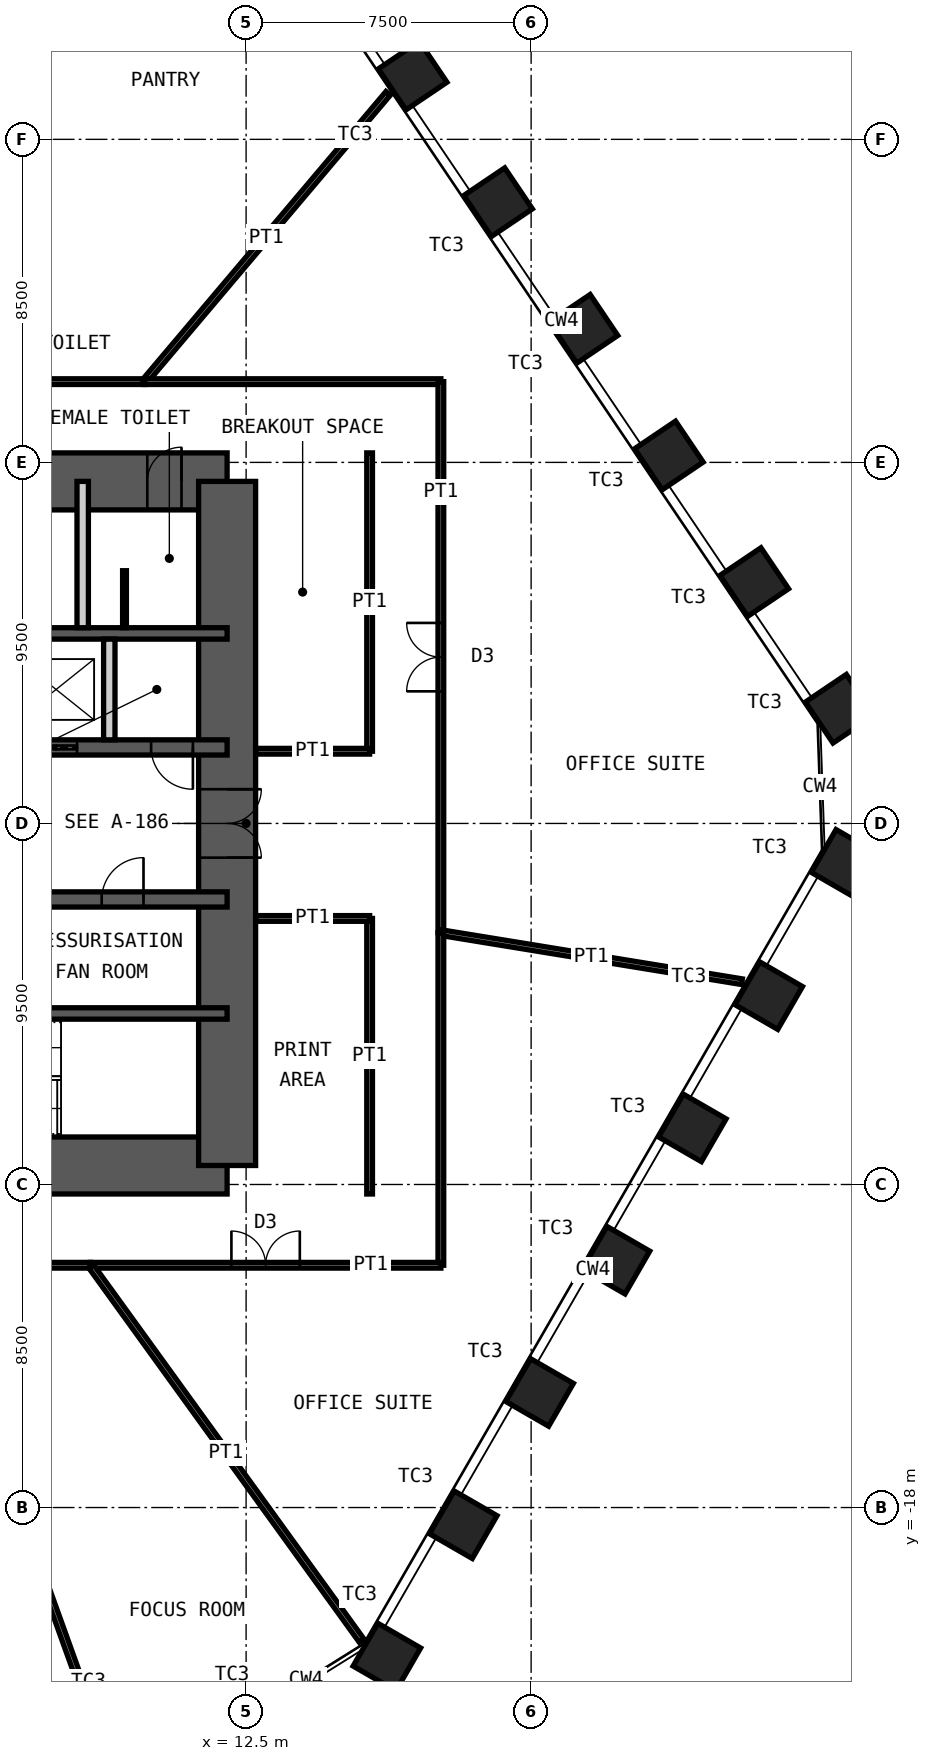
"""IFC4 building model, lengths in metres.
Left out: names, types, materials, properties, quantities, classifications, styles, units other than length and angle.
Written with IfcOpenShell. Run it as: python <this file> out.ifc"""

import sys

from ifc_helpers import new_model, si_unit, direction, frame, frame_2d, origin, origin_2d, place, context, subcontext, project, spatial, rectangle, hollow_rectangle, extrude, element, fill, save


model = new_model("IFC4")
c1 = context("Model", 3, precision=1e-05, world=origin(), true_north=direction((0.0, 1.0)))
c2 = subcontext(c1, "Body", "Model", "MODEL_VIEW")
j1 = project(units=[si_unit("LENGTHUNIT", "METRE"), si_unit("PLANEANGLEUNIT", "RADIAN")], contexts=[c1])
p1 = place(None, origin())
s1 = spatial("IfcSite", under=j1, at=p1, CompositionType="ELEMENT")
p2 = place(p1, origin())
s2 = spatial("IfcBuilding", under=s1, at=p2, CompositionType="ELEMENT")
p3 = place(p2, frame((0.0, 0.0, 111.4)))
s3 = spatial("IfcBuildingStorey", under=s2, at=p3, CompositionType="ELEMENT", Elevation=111.4)
for number, where, z_axis, x_axis in (
    (1, (16.882, 19.678, 0.0), (0.0, 0.0, 1.0), (-0.559, 0.829, 0.0)),
    (2, (19.13, 16.346, 0.0), (0.0, 0.0, 1.0), (-0.559, 0.829, 0.0)),
    (3, (21.377, 13.014, 0.0), (0.0, 0.0, 1.0), (-0.559, 0.829, 0.0)),
    (4, (23.625, 9.682, 0.0), (0.0, 0.0, 1.0), (-0.559, 0.829, 0.0)),
    (5, (25.872, 6.351, 0.0), (0.0, 0.0, 1.0), (-0.559, 0.829, 0.0)),
    (6, (28.119, 3.019, 0.0), (0.0, 0.0, 1.0), (-0.559, 0.829, 0.0)),
    (7, (28.261, -1.05, 0.0), (0.0, 0.0, 1.0), (0.5, 0.866, 0.0)),
    (8, (26.252, -4.53, 0.0), (0.0, 0.0, 1.0), (0.5, 0.866, 0.0)),
    (9, (24.242, -8.011, 0.0), (0.0, 0.0, 1.0), (0.5, 0.866, 0.0)),
    (10, (22.233, -11.491, 0.0), (0.0, 0.0, 1.0), (0.5, 0.866, 0.0)),
    (11, (20.223, -14.972, 0.0), (0.0, 0.0, 1.0), (0.5, 0.866, 0.0)),
    (12, (18.214, -18.453, 0.0), (0.0, 0.0, 1.0), (0.5, 0.866, 0.0)),
    (13, (16.204, -21.933, 0.0), (0.0, 0.0, 1.0), (0.5, 0.866, 0.0)),
):
    element("IfcColumn", number, at=place(p3, frame(where, z_axis=z_axis, x_axis=x_axis)), inside=s3, PredefinedType="COLUMN", context=c2, shape_type="SweptSolid", body=[
        extrude(hollow_rectangle(XDim=1.3, YDim=1.3, WallThickness=0.1, at=origin_2d()), origin(), (0.0, 0.0, 1.0), 4.2),
    ])
p4 = place(p3, frame((-12.0, 9.0, 0.0), z_axis=(0.0, 0.0, 1.0), x_axis=(1.0, 0.0, 0.0)))
e14 = element("IfcWall", 14, at=p4, inside=s3, PredefinedType="SHEAR", context=c2, shape_type="SweptSolid", body=[
    extrude(rectangle(XDim=24.0, YDim=1.5, at=frame_2d((12.0, 0.0))), origin(), (0.0, 0.0, 1.0), 4.2),
])
p5 = place(p4, frame((10.4, 0.0, 0.0)))
e15 = element("IfcOpeningElement", 15, at=p5, cuts=e14, PredefinedType="OPENING", context=c2, shape_type="SweptSolid", body=[
    extrude(rectangle(XDim=1.0, YDim=2.1, at=frame_2d((0.5, 1.05))), frame((0.0, 0.76, 0.0), z_axis=(0.0, -1.0, 0.0), x_axis=(1.0, 0.0, 0.0)), (0.0, 0.0, 1.0), 1.52),
])
p6 = place(p4, frame((17.6, 0.0, 0.0)))
e16 = element("IfcOpeningElement", 16, at=p6, cuts=e14, PredefinedType="OPENING", context=c2, shape_type="SweptSolid", body=[
    extrude(rectangle(XDim=0.9, YDim=2.1, at=frame_2d((0.45, 1.05))), frame((0.0, 0.76, 0.0), z_axis=(0.0, -1.0, 0.0), x_axis=(1.0, 0.0, 0.0)), (0.0, 0.0, 1.0), 1.52),
])
p7 = place(p4, frame((21.9, 0.0, 0.0)))
e17 = element("IfcOpeningElement", 17, at=p7, cuts=e14, PredefinedType="OPENING", context=c2, shape_type="SweptSolid", body=[
    extrude(rectangle(XDim=0.9, YDim=2.1, at=frame_2d((0.45, 1.05))), frame((0.0, 0.76, 0.0), z_axis=(0.0, -1.0, 0.0), x_axis=(1.0, 0.0, 0.0)), (0.0, 0.0, 1.0), 1.52),
])
p8 = place(p3, frame((-12.0, -9.0, 0.0), z_axis=(0.0, 0.0, 1.0), x_axis=(1.0, 0.0, 0.0)))
e18 = element("IfcWall", 18, at=p8, inside=s3, PredefinedType="SHEAR", context=c2, shape_type="SweptSolid", body=[
    extrude(rectangle(XDim=24.0, YDim=1.5, at=frame_2d((12.0, 0.0))), origin(), (0.0, 0.0, 1.0), 4.2),
])
p9 = place(p8, frame((1.35, 0.0, 0.0)))
e19 = element("IfcOpeningElement", 19, at=p9, cuts=e18, PredefinedType="OPENING", context=c2, shape_type="SweptSolid", body=[
    extrude(rectangle(XDim=1.0, YDim=2.1, at=frame_2d((0.5, 1.05))), frame((0.0, 0.76, 0.0), z_axis=(0.0, -1.0, 0.0), x_axis=(1.0, 0.0, 0.0)), (0.0, 0.0, 1.0), 1.52),
])
p10 = place(p8, frame((5.325, 0.0, 0.0)))
e20 = element("IfcOpeningElement", 20, at=p10, cuts=e18, PredefinedType="OPENING", context=c2, shape_type="SweptSolid", body=[
    extrude(rectangle(XDim=1.15, YDim=2.1, at=frame_2d((0.575, 1.05))), frame((0.0, 0.76, 0.0), z_axis=(0.0, -1.0, 0.0), x_axis=(1.0, 0.0, 0.0)), (0.0, 0.0, 1.0), 1.52),
])
p11 = place(p8, frame((12.6, 0.0, 0.0)))
e21 = element("IfcOpeningElement", 21, at=p11, cuts=e18, PredefinedType="OPENING", context=c2, shape_type="SweptSolid", body=[
    extrude(rectangle(XDim=1.0, YDim=2.1, at=frame_2d((0.5, 1.05))), frame((0.0, 0.76, 0.0), z_axis=(0.0, -1.0, 0.0), x_axis=(1.0, 0.0, 0.0)), (0.0, 0.0, 1.0), 1.52),
])
p12 = place(p3, frame((12.0, -9.0, 0.0), z_axis=(0.0, 0.0, 1.0), x_axis=(0.0, 1.0, 0.0)))
e22 = element("IfcWall", 22, at=p12, inside=s3, PredefinedType="SHEAR", context=c2, shape_type="SweptSolid", body=[
    extrude(rectangle(XDim=18.0, YDim=1.5, at=frame_2d((9.0, 0.0))), origin(), (0.0, 0.0, 1.0), 4.2),
])
p13 = place(p12, frame((8.1, 0.0, 0.0)))
e23 = element("IfcOpeningElement", 23, at=p13, cuts=e22, PredefinedType="OPENING", context=c2, shape_type="SweptSolid", body=[
    extrude(rectangle(XDim=1.8, YDim=2.1, at=frame_2d((0.9, 1.05))), frame((0.0, 0.76, 0.0), z_axis=(0.0, -1.0, 0.0), x_axis=(1.0, 0.0, 0.0)), (0.0, 0.0, 1.0), 1.52),
])
p14 = place(p3, frame((-12.0, 5.0, 0.0), z_axis=(0.0, 0.0, 1.0), x_axis=(1.0, 0.0, 0.0)))
e24 = element("IfcWall", 24, at=p14, inside=s3, PredefinedType="SHEAR", context=c2, shape_type="SweptSolid", body=[
    extrude(rectangle(XDim=24.0, YDim=0.3, at=frame_2d((12.0, 0.0))), origin(), (0.0, 0.0, 1.0), 4.2),
])
p15 = place(p3, frame((-12.0, 2.0, 0.0), z_axis=(0.0, 0.0, 1.0), x_axis=(1.0, 0.0, 0.0)))
e25 = element("IfcWall", 25, at=p15, inside=s3, PredefinedType="SHEAR", context=c2, shape_type="SweptSolid", body=[
    extrude(rectangle(XDim=24.0, YDim=0.4, at=frame_2d((12.0, 0.0))), origin(), (0.0, 0.0, 1.0), 4.2),
])
p16 = place(p15, frame((2.4, 0.0, 0.0)))
e26 = element("IfcOpeningElement", 26, at=p16, cuts=e25, PredefinedType="OPENING", context=c2, shape_type="SweptSolid", body=[
    extrude(rectangle(XDim=1.1, YDim=2.1, at=frame_2d((0.55, 1.05))), frame((0.0, 0.21, 0.0), z_axis=(0.0, -1.0, 0.0), x_axis=(1.0, 0.0, 0.0)), (0.0, 0.0, 1.0), 0.42),
])
p17 = place(p15, frame((22.0, 0.0, 0.0)))
e27 = element("IfcOpeningElement", 27, at=p17, cuts=e25, PredefinedType="OPENING", context=c2, shape_type="SweptSolid", body=[
    extrude(rectangle(XDim=1.1, YDim=2.1, at=frame_2d((0.55, 1.05))), frame((0.0, 0.21, 0.0), z_axis=(0.0, -1.0, 0.0), x_axis=(1.0, 0.0, 0.0)), (0.0, 0.0, 1.0), 0.42),
])
p18 = place(p15, frame((10.15, 0.0, 0.0)))
e28 = element("IfcOpeningElement", 28, at=p18, cuts=e25, PredefinedType="OPENING", context=c2, shape_type="SweptSolid", body=[
    extrude(rectangle(XDim=1.0, YDim=2.1, at=frame_2d((0.5, 1.05))), frame((0.0, 0.21, 0.0), z_axis=(0.0, -1.0, 0.0), x_axis=(1.0, 0.0, 0.0)), (0.0, 0.0, 1.0), 0.42),
])
p19 = place(p15, frame((6.9, 0.0, 0.0)))
e29 = element("IfcOpeningElement", 29, at=p19, cuts=e25, PredefinedType="OPENING", context=c2, shape_type="SweptSolid", body=[
    extrude(rectangle(XDim=1.0, YDim=2.1, at=frame_2d((0.5, 1.05))), frame((0.0, 0.21, 0.0), z_axis=(0.0, -1.0, 0.0), x_axis=(1.0, 0.0, 0.0)), (0.0, 0.0, 1.0), 0.42),
])
p20 = place(p15, frame((13.35, 0.0, 0.0)))
e30 = element("IfcOpeningElement", 30, at=p20, cuts=e25, PredefinedType="OPENING", context=c2, shape_type="SweptSolid", body=[
    extrude(rectangle(XDim=1.1, YDim=2.4, at=frame_2d((0.55, 1.2))), frame((0.0, 0.21, 0.0), z_axis=(0.0, -1.0, 0.0), x_axis=(1.0, 0.0, 0.0)), (0.0, 0.0, 1.0), 0.42),
])
p21 = place(p15, frame((16.15, 0.0, 0.0)))
e31 = element("IfcOpeningElement", 31, at=p21, cuts=e25, PredefinedType="OPENING", context=c2, shape_type="SweptSolid", body=[
    extrude(rectangle(XDim=1.1, YDim=2.4, at=frame_2d((0.55, 1.2))), frame((0.0, 0.21, 0.0), z_axis=(0.0, -1.0, 0.0), x_axis=(1.0, 0.0, 0.0)), (0.0, 0.0, 1.0), 0.42),
])
p22 = place(p15, frame((18.95, 0.0, 0.0)))
e32 = element("IfcOpeningElement", 32, at=p22, cuts=e25, PredefinedType="OPENING", context=c2, shape_type="SweptSolid", body=[
    extrude(rectangle(XDim=1.1, YDim=2.4, at=frame_2d((0.55, 1.2))), frame((0.0, 0.21, 0.0), z_axis=(0.0, -1.0, 0.0), x_axis=(1.0, 0.0, 0.0)), (0.0, 0.0, 1.0), 0.42),
])
p23 = place(p3, frame((-12.0, -2.0, 0.0), z_axis=(0.0, 0.0, 1.0), x_axis=(1.0, 0.0, 0.0)))
e33 = element("IfcWall", 33, at=p23, inside=s3, PredefinedType="SHEAR", context=c2, shape_type="SweptSolid", body=[
    extrude(rectangle(XDim=24.0, YDim=0.4, at=frame_2d((12.0, 0.0))), origin(), (0.0, 0.0, 1.0), 4.2),
])
p24 = place(p23, frame((1.1, 0.0, 0.0)))
e34 = element("IfcOpeningElement", 34, at=p24, cuts=e33, PredefinedType="OPENING", context=c2, shape_type="SweptSolid", body=[
    extrude(rectangle(XDim=1.1, YDim=2.1, at=frame_2d((0.55, 1.05))), frame((0.0, 0.21, 0.0), z_axis=(0.0, -1.0, 0.0), x_axis=(1.0, 0.0, 0.0)), (0.0, 0.0, 1.0), 0.42),
])
p25 = place(p23, frame((13.55, 0.0, 0.0)))
e35 = element("IfcOpeningElement", 35, at=p25, cuts=e33, PredefinedType="OPENING", context=c2, shape_type="SweptSolid", body=[
    extrude(rectangle(XDim=1.1, YDim=2.1, at=frame_2d((0.55, 1.05))), frame((0.0, 0.21, 0.0), z_axis=(0.0, -1.0, 0.0), x_axis=(1.0, 0.0, 0.0)), (0.0, 0.0, 1.0), 0.42),
])
p26 = place(p23, frame((20.7, 0.0, 0.0)))
e36 = element("IfcOpeningElement", 36, at=p26, cuts=e33, PredefinedType="OPENING", context=c2, shape_type="SweptSolid", body=[
    extrude(rectangle(XDim=1.1, YDim=2.1, at=frame_2d((0.55, 1.05))), frame((0.0, 0.21, 0.0), z_axis=(0.0, -1.0, 0.0), x_axis=(1.0, 0.0, 0.0)), (0.0, 0.0, 1.0), 0.42),
])
p27 = place(p23, frame((4.0, 0.0, 0.0)))
e37 = element("IfcOpeningElement", 37, at=p27, cuts=e33, PredefinedType="OPENING", context=c2, shape_type="SweptSolid", body=[
    extrude(rectangle(XDim=1.0, YDim=2.1, at=frame_2d((0.5, 1.05))), frame((0.0, 0.21, 0.0), z_axis=(0.0, -1.0, 0.0), x_axis=(1.0, 0.0, 0.0)), (0.0, 0.0, 1.0), 0.42),
])
p28 = place(p3, frame((-12.0, -5.0, 0.0), z_axis=(0.0, 0.0, 1.0), x_axis=(1.0, 0.0, 0.0)))
e38 = element("IfcWall", 38, at=p28, inside=s3, PredefinedType="SHEAR", context=c2, shape_type="SweptSolid", body=[
    extrude(rectangle(XDim=24.0, YDim=0.3, at=frame_2d((12.0, 0.0))), origin(), (0.0, 0.0, 1.0), 4.2),
])
p29 = place(p3, frame((8.2, 5.15, 0.0), z_axis=(0.0, 0.0, 1.0), x_axis=(0.0, 1.0, 0.0)))
e39 = element("IfcWall", 39, at=p29, inside=s3, PredefinedType="PARTITIONING", context=c2, shape_type="SweptSolid", body=[
    extrude(rectangle(XDim=3.85, YDim=0.3, at=frame_2d((1.925, 0.0))), origin(), (0.0, 0.0, 1.0), 3.98),
])
p30 = place(p3, frame((8.9, 2.2, 0.0), z_axis=(0.0, 0.0, 1.0), x_axis=(0.0, 1.0, 0.0)))
e40 = element("IfcWall", 40, at=p30, inside=s3, PredefinedType="PARTITIONING", context=c2, shape_type="SweptSolid", body=[
    extrude(rectangle(XDim=2.65, YDim=0.3, at=frame_2d((1.325, 0.0))), origin(), (0.0, 0.0, 1.0), 3.98),
])
p31 = place(p3, frame((9.3, 5.15, 0.0), z_axis=(0.0, 0.0, 1.0), x_axis=(0.0, 1.0, 0.0)))
e41 = element("IfcWall", 41, at=p31, inside=s3, PredefinedType="PARTITIONING", context=c2, shape_type="SweptSolid", body=[
    extrude(rectangle(XDim=1.5, YDim=0.1, at=frame_2d((0.75, 0.0))), origin(), (0.0, 0.0, 1.0), 2.1),
])
p32 = place(p3, frame((3.288, 11.625, 0.0), z_axis=(0.0, 0.0, 1.0), x_axis=(1.0, 0.0, 0.0)))
e42 = element("IfcWall", 42, at=p32, inside=s3, PredefinedType="PARTITIONING", context=c2, shape_type="SweptSolid", body=[
    extrude(rectangle(XDim=6.538, YDim=0.15, at=frame_2d((3.269, 0.0))), origin(), (0.0, 0.0, 1.0), 4.03),
])
p33 = place(p32, frame((2.769, 0.0, 0.0)))
e43 = element("IfcOpeningElement", 43, at=p33, cuts=e42, PredefinedType="OPENING", context=c2, shape_type="SweptSolid", body=[
    extrude(rectangle(XDim=1.0, YDim=2.4, at=frame_2d((0.5, 1.2))), frame((0.0, 0.085, 0.0), z_axis=(0.0, -1.0, 0.0), x_axis=(1.0, 0.0, 0.0)), (0.0, 0.0, 1.0), 0.17),
])
p34 = place(p3, frame((16.237, 19.21, 0.0), z_axis=(0.0, 0.0, 1.0), x_axis=(-0.645526723652, -0.763737683404, 0.0)))
e44 = element("IfcWall", 44, at=p34, inside=s3, PredefinedType="PARTITIONING", context=c2, shape_type="SweptSolid", body=[
    extrude(rectangle(XDim=9.932, YDim=0.15, at=frame_2d((4.966, 0.0))), origin(), (0.0, 0.0, 1.0), 3.33),
])
p35 = place(p3, frame((9.826, 11.625, 0.0), z_axis=(0.0, 0.0, 1.0), x_axis=(1.0, 0.0, 0.0)))
e45 = element("IfcWall", 45, at=p35, inside=s3, PredefinedType="PARTITIONING", context=c2, shape_type="SweptSolid", body=[
    extrude(rectangle(XDim=7.799, YDim=0.15, at=frame_2d((3.899, 0.0))), origin(), (0.0, 0.0, 1.0), 4.03),
])
p36 = place(p3, frame((17.625, 11.625, 0.0), z_axis=(0.0, 0.0, 1.0), x_axis=(0.0, -1.0, 0.0)))
e46 = element("IfcWall", 46, at=p36, inside=s3, PredefinedType="PARTITIONING", context=c2, shape_type="SweptSolid", body=[
    extrude(rectangle(XDim=14.498, YDim=0.15, at=frame_2d((7.249, 0.0))), origin(), (0.0, 0.0, 1.0), 4.03),
])
p37 = place(p36, frame((6.349, 0.0, 0.0)))
e47 = element("IfcOpeningElement", 47, at=p37, cuts=e46, PredefinedType="OPENING", context=c2, shape_type="SweptSolid", body=[
    extrude(rectangle(XDim=1.8, YDim=2.4, at=frame_2d((0.9, 1.2))), frame((0.0, 0.085, 0.0), z_axis=(0.0, -1.0, 0.0), x_axis=(1.0, 0.0, 0.0)), (0.0, 0.0, 1.0), 0.17),
])
p38 = place(p3, frame((25.547, -4.164, 0.0), z_axis=(0.0, 0.0, 1.0), x_axis=(-0.986975392039, 0.160871301072, 0.0)))
e48 = element("IfcWall", 48, at=p38, inside=s3, PredefinedType="PARTITIONING", context=c2, shape_type="SweptSolid", body=[
    extrude(rectangle(XDim=8.027, YDim=0.15, at=frame_2d((4.013, 0.0))), origin(), (0.0, 0.0, 1.0), 4.03),
])
p39 = place(p3, frame((17.625, -2.873, 0.0), z_axis=(0.0, 0.0, 1.0), x_axis=(0.0, -1.0, 0.0)))
e49 = element("IfcWall", 49, at=p39, inside=s3, PredefinedType="PARTITIONING", context=c2, shape_type="SweptSolid", body=[
    extrude(rectangle(XDim=8.752, YDim=0.15, at=frame_2d((4.376, 0.0))), origin(), (0.0, 0.0, 1.0), 4.03),
])
p40 = place(p3, frame((17.625, -11.625, 0.0), z_axis=(0.0, 0.0, 1.0), x_axis=(-1.0, 0.0, 0.0)))
e50 = element("IfcWall", 50, at=p40, inside=s3, PredefinedType="PARTITIONING", context=c2, shape_type="SweptSolid", body=[
    extrude(rectangle(XDim=9.224, YDim=0.15, at=frame_2d((4.612, 0.0))), origin(), (0.0, 0.0, 1.0), 4.03),
])
p41 = place(p40, frame((3.712, 0.0, 0.0)))
e51 = element("IfcOpeningElement", 51, at=p41, cuts=e50, PredefinedType="OPENING", context=c2, shape_type="SweptSolid", body=[
    extrude(rectangle(XDim=1.8, YDim=2.4, at=frame_2d((0.9, 1.2))), frame((0.0, 0.085, 0.0), z_axis=(0.0, -1.0, 0.0), x_axis=(1.0, 0.0, 0.0)), (0.0, 0.0, 1.0), 0.17),
])
p42 = place(p3, frame((15.54, -21.502, 0.0), z_axis=(0.0, 0.0, 1.0), x_axis=(-0.585731902034, 0.810504866697, 0.0)))
e52 = element("IfcWall", 52, at=p42, inside=s3, PredefinedType="PARTITIONING", context=c2, shape_type="SweptSolid", body=[
    extrude(rectangle(XDim=12.187, YDim=0.15, at=frame_2d((6.093, 0.0))), origin(), (0.0, 0.0, 1.0), 2.93),
])
p43 = place(p3, frame((8.401, -11.625, 0.0), z_axis=(0.0, 0.0, 1.0), x_axis=(-1.0, 0.0, 0.0)))
e53 = element("IfcWall", 53, at=p43, inside=s3, PredefinedType="PARTITIONING", context=c2, shape_type="SweptSolid", body=[
    extrude(rectangle(XDim=4.217, YDim=0.15, at=frame_2d((2.109, 0.0))), origin(), (0.0, 0.0, 1.0), 4.03),
])
p44 = place(p43, frame((1.609, 0.0, 0.0)))
e54 = element("IfcOpeningElement", 54, at=p44, cuts=e53, PredefinedType="OPENING", context=c2, shape_type="SweptSolid", body=[
    extrude(rectangle(XDim=1.0, YDim=2.4, at=frame_2d((0.5, 1.2))), frame((0.0, 0.085, 0.0), z_axis=(0.0, -1.0, 0.0), x_axis=(1.0, 0.0, 0.0)), (0.0, 0.0, 1.0), 0.17),
])
p45 = place(p3, frame((8.518, -23.667, 0.0), z_axis=(0.0, 0.0, 1.0), x_axis=(-0.338635030469, 0.940917805198, 0.0)))
e55 = element("IfcWall", 55, at=p45, inside=s3, PredefinedType="PARTITIONING", context=c2, shape_type="SweptSolid", body=[
    extrude(rectangle(XDim=12.798, YDim=0.15, at=frame_2d((6.399, 0.0))), origin(), (0.0, 0.0, 1.0), 3.33),
])
p46 = place(p3, frame((15.75, 1.9, 0.0), z_axis=(0.0, 0.0, 1.0), x_axis=(0.0, 1.0, 0.0)))
e56 = element("IfcWall", 56, at=p46, inside=s3, PredefinedType="PARTITIONING", context=c2, shape_type="SweptSolid", body=[
    extrude(rectangle(XDim=7.85, YDim=0.15, at=frame_2d((3.925, 0.0))), origin(), (0.0, 0.0, 1.0), 4.03),
])
p47 = place(p3, frame((12.75, 1.9, 0.0), z_axis=(0.0, 0.0, 1.0), x_axis=(1.0, 0.0, 0.0)))
e57 = element("IfcWall", 57, at=p47, inside=s3, PredefinedType="PARTITIONING", context=c2, shape_type="SweptSolid", body=[
    extrude(rectangle(XDim=3.0, YDim=0.15, at=frame_2d((1.5, 0.0))), origin(), (0.0, 0.0, 1.0), 2.93),
])
p48 = place(p3, frame((15.75, -9.75, 0.0), z_axis=(0.0, 0.0, 1.0), x_axis=(0.0, 1.0, 0.0)))
e58 = element("IfcWall", 58, at=p48, inside=s3, PredefinedType="PARTITIONING", context=c2, shape_type="SweptSolid", body=[
    extrude(rectangle(XDim=7.25, YDim=0.15, at=frame_2d((3.625, 0.0))), origin(), (0.0, 0.0, 1.0), 4.03),
])
p49 = place(p3, frame((12.75, -2.5, 0.0), z_axis=(0.0, 0.0, 1.0), x_axis=(1.0, 0.0, 0.0)))
e59 = element("IfcWall", 59, at=p49, inside=s3, PredefinedType="PARTITIONING", context=c2, shape_type="SweptSolid", body=[
    extrude(rectangle(XDim=3.0, YDim=0.15, at=frame_2d((1.5, 0.0))), origin(), (0.0, 0.0, 1.0), 3.33),
])
p50 = place(p7, origin())
e60 = element("IfcDoor", 60, at=p50, inside=s3, OperationType="SINGLE_SWING_LEFT", PredefinedType="DOOR", context=c2, shape_type="SweptSolid", body=[
    extrude(rectangle(XDim=0.9, YDim=2.1, at=frame_2d((0.45, 1.05))), frame((0.0, 0.025, 0.0), z_axis=(0.0, -1.0, 0.0), x_axis=(1.0, 0.0, 0.0)), (0.0, 0.0, 1.0), 0.05),
])
fill(e17, e60)
p51 = place(p17, origin())
e61 = element("IfcDoor", 61, at=p51, inside=s3, OperationType="SINGLE_SWING_RIGHT", PredefinedType="DOOR", context=c2, shape_type="SweptSolid", body=[
    extrude(rectangle(XDim=1.1, YDim=2.1, at=frame_2d((0.55, 1.05))), frame((0.0, 0.025, 0.0), z_axis=(0.0, -1.0, 0.0), x_axis=(1.0, 0.0, 0.0)), (0.0, 0.0, 1.0), 0.05),
])
fill(e27, e61)
p52 = place(p26, origin())
e62 = element("IfcDoor", 62, at=p52, inside=s3, OperationType="SINGLE_SWING_LEFT", PredefinedType="DOOR", context=c2, shape_type="SweptSolid", body=[
    extrude(rectangle(XDim=1.1, YDim=2.1, at=frame_2d((0.55, 1.05))), frame((0.0, 0.025, 0.0), z_axis=(0.0, -1.0, 0.0), x_axis=(1.0, 0.0, 0.0)), (0.0, 0.0, 1.0), 0.05),
])
fill(e36, e62)
p53 = place(p13, origin())
e63 = element("IfcDoor", 63, at=p53, inside=s3, OperationType="DOUBLE_DOOR_DOUBLE_SWING", PredefinedType="DOOR", context=c2, shape_type="SweptSolid", body=[
    extrude(rectangle(XDim=1.8, YDim=2.1, at=frame_2d((0.9, 1.05))), frame((0.0, 0.025, 0.0), z_axis=(0.0, -1.0, 0.0), x_axis=(1.0, 0.0, 0.0)), (0.0, 0.0, 1.0), 0.05),
])
fill(e23, e63)
p54 = place(p22, origin())
e64 = element("IfcDoor", 64, at=p54, inside=s3, OperationType="DOUBLE_DOOR_SLIDING", PredefinedType="DOOR", context=c2, shape_type="SweptSolid", body=[
    extrude(rectangle(XDim=1.1, YDim=2.4, at=frame_2d((0.55, 1.2))), frame((0.0, 0.025, 0.0), z_axis=(0.0, -1.0, 0.0), x_axis=(1.0, 0.0, 0.0)), (0.0, 0.0, 1.0), 0.05),
])
fill(e32, e64)
p55 = place(p37, origin())
e65 = element("IfcDoor", 65, at=p55, inside=s3, OperationType="DOUBLE_DOOR_DOUBLE_SWING", PredefinedType="DOOR", context=c2, shape_type="SweptSolid", body=[
    extrude(rectangle(XDim=1.8, YDim=2.4, at=frame_2d((0.9, 1.2))), frame((0.0, 0.025, 0.0), z_axis=(0.0, -1.0, 0.0), x_axis=(1.0, 0.0, 0.0)), (0.0, 0.0, 1.0), 0.05),
])
fill(e47, e65)
p56 = place(p41, origin())
e66 = element("IfcDoor", 66, at=p56, inside=s3, OperationType="DOUBLE_DOOR_DOUBLE_SWING", PredefinedType="DOOR", context=c2, shape_type="SweptSolid", body=[
    extrude(rectangle(XDim=1.8, YDim=2.4, at=frame_2d((0.9, 1.2))), frame((0.0, 0.025, 0.0), z_axis=(0.0, -1.0, 0.0), x_axis=(1.0, 0.0, 0.0)), (0.0, 0.0, 1.0), 0.05),
])
fill(e51, e66)
save(model, sys.argv[1])
